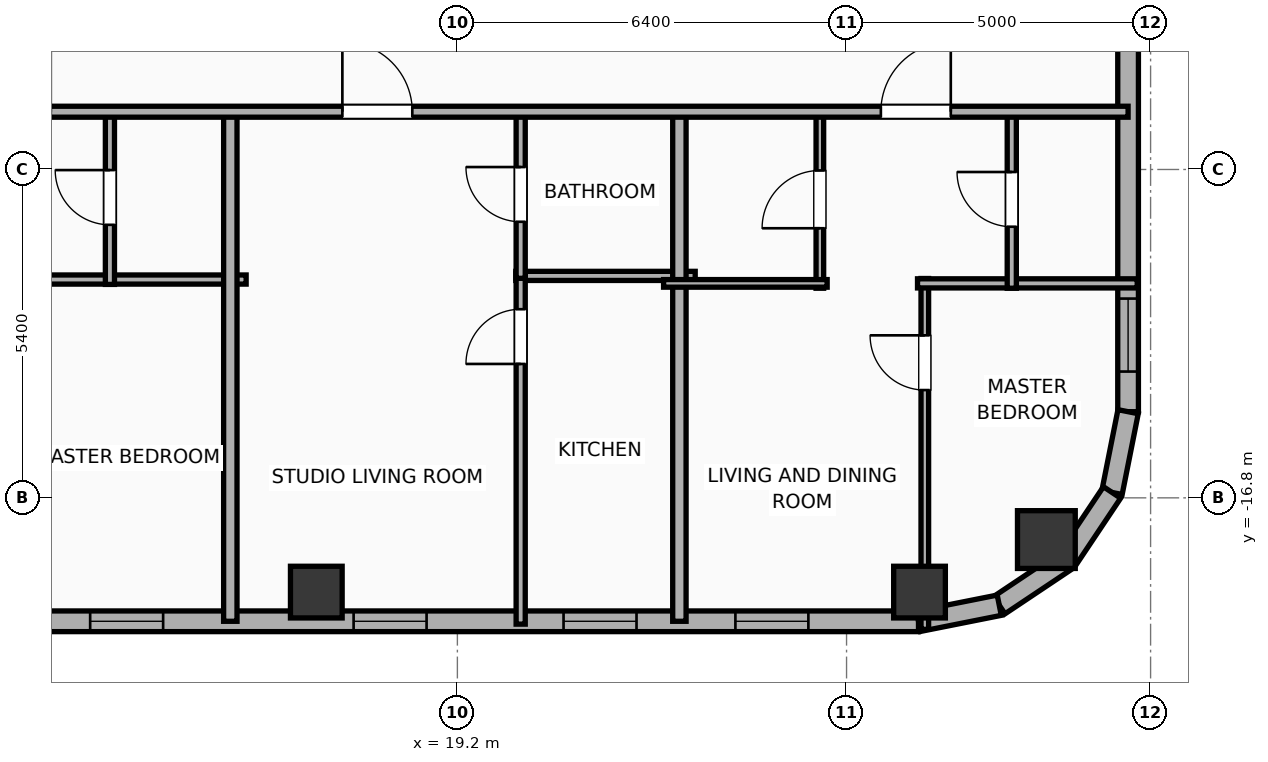
"""IFC4 building model, lengths in metres.
Left out: names, types, materials, properties, quantities, classifications, styles, units other than length and angle.
Written with IfcOpenShell. Run it as: python <this file> out.ifc"""

import sys

from ifc_helpers import new_model, si_unit, direction, frame, frame_2d, origin, origin_2d, place, context, subcontext, project, spatial, rectangle, hollow_rectangle, hollow_circle, extrude, element, fill, save


model = new_model("IFC4")
c1 = context("Model", 3, precision=1e-05, world=origin(), true_north=direction((0.0, 1.0)))
c2 = subcontext(c1, "Body", "Model", "MODEL_VIEW")
j1 = project(units=[si_unit("LENGTHUNIT", "METRE"), si_unit("PLANEANGLEUNIT", "RADIAN")], contexts=[c1])
p1 = place(None, origin())
s1 = spatial("IfcSite", under=j1, at=p1, CompositionType="ELEMENT")
p2 = place(p1, origin())
s2 = spatial("IfcBuilding", under=s1, at=p2, CompositionType="ELEMENT")
p3 = place(p2, frame((0.0, 0.0, 227.5)))
s3 = spatial("IfcBuildingStorey", under=s2, at=p3, CompositionType="ELEMENT", Elevation=227.5)
for number, where, z_axis, x_axis in (
    (1, (16.88, -18.35, 0.0), (0.0, 0.0, 1.0), (1.0, 0.0, 0.0)),
    (2, (26.8, -18.35, 0.0), (0.0, 0.0, 1.0), (1.0, 0.0, 0.0)),
):
    element("IfcColumn", number, at=place(p3, frame(where, z_axis=z_axis, x_axis=x_axis)), inside=s3, PredefinedType="COLUMN", context=c2, shape_type="SweptSolid", body=[
        extrude(hollow_rectangle(XDim=0.85, YDim=0.85, WallThickness=0.028, at=origin_2d()), origin(), (0.0, 0.0, 1.0), 3.9),
    ])
p4 = place(p3, frame((28.886, -17.486, 0.0), z_axis=(0.0, 0.0, 1.0), x_axis=(1.0, 0.0, 0.0)))
e3 = element("IfcColumn", 3, at=p4, inside=s3, PredefinedType="COLUMN", context=c2, shape_type="SweptSolid", body=[
    extrude(hollow_circle(Radius=0.475, WallThickness=0.032, at=origin_2d()), origin(), (0.0, 0.0, 1.0), 3.9),
])
p5 = place(p3, frame((26.783, -18.83, 0.0), z_axis=(0.0, 0.0, 1.0), x_axis=(-1.0, 0.0, 0.0)))
e4 = element("IfcWall", 4, at=p5, inside=s3, PredefinedType="ELEMENTEDWALL", context=c2, shape_type="SweptSolid", body=[
    extrude(rectangle(XDim=49.566, YDim=0.34, at=frame_2d((24.783, 0.0))), origin(), (0.0, 0.0, 1.0), 3.65),
])
p6 = place(p5, frame((23.583, 0.0, 0.75)))
e5 = element("IfcOpeningElement", 5, at=p6, cuts=e4, PredefinedType="OPENING", context=c2, shape_type="SweptSolid", body=[
    extrude(rectangle(XDim=2.4, YDim=2.1, at=frame_2d((1.2, 1.05))), frame((0.0, 0.18, 0.0), z_axis=(0.0, -1.0, 0.0), x_axis=(1.0, 0.0, 0.0)), (0.0, 0.0, 1.0), 0.36),
])
p7 = place(p5, frame((41.756, 0.0, 0.75)))
e6 = element("IfcOpeningElement", 6, at=p7, cuts=e4, PredefinedType="OPENING", context=c2, shape_type="SweptSolid", body=[
    extrude(rectangle(XDim=2.4, YDim=2.1, at=frame_2d((1.2, 1.05))), frame((0.0, 0.18, 0.0), z_axis=(0.0, -1.0, 0.0), x_axis=(1.0, 0.0, 0.0)), (0.0, 0.0, 1.0), 0.36),
])
p8 = place(p5, frame((47.222, 0.0, 0.75)))
e7 = element("IfcOpeningElement", 7, at=p8, cuts=e4, PredefinedType="OPENING", context=c2, shape_type="SweptSolid", body=[
    extrude(rectangle(XDim=1.2, YDim=2.05, at=frame_2d((0.6, 1.025))), frame((0.0, 0.18, 0.0), z_axis=(0.0, -1.0, 0.0), x_axis=(1.0, 0.0, 0.0)), (0.0, 0.0, 1.0), 0.36),
])
p9 = place(p5, frame((45.181, 0.0, 0.75)))
e8 = element("IfcOpeningElement", 8, at=p9, cuts=e4, PredefinedType="OPENING", context=c2, shape_type="SweptSolid", body=[
    extrude(rectangle(XDim=1.2, YDim=2.05, at=frame_2d((0.6, 1.025))), frame((0.0, 0.18, 0.0), z_axis=(0.0, -1.0, 0.0), x_axis=(1.0, 0.0, 0.0)), (0.0, 0.0, 1.0), 0.36),
])
p10 = place(p5, frame((37.289, 0.0, 0.75)))
e9 = element("IfcOpeningElement", 9, at=p10, cuts=e4, PredefinedType="OPENING", context=c2, shape_type="SweptSolid", body=[
    extrude(rectangle(XDim=1.2, YDim=2.05, at=frame_2d((0.6, 1.025))), frame((0.0, 0.18, 0.0), z_axis=(0.0, -1.0, 0.0), x_axis=(1.0, 0.0, 0.0)), (0.0, 0.0, 1.0), 0.36),
])
p11 = place(p5, frame((16.115, 0.0, 0.75)))
e10 = element("IfcOpeningElement", 10, at=p11, cuts=e4, PredefinedType="OPENING", context=c2, shape_type="SweptSolid", body=[
    extrude(rectangle(XDim=1.2, YDim=2.05, at=frame_2d((0.6, 1.025))), frame((0.0, 0.18, 0.0), z_axis=(0.0, -1.0, 0.0), x_axis=(1.0, 0.0, 0.0)), (0.0, 0.0, 1.0), 0.36),
])
p12 = place(p5, frame((12.422, 0.0, 0.75)))
e11 = element("IfcOpeningElement", 11, at=p12, cuts=e4, PredefinedType="OPENING", context=c2, shape_type="SweptSolid", body=[
    extrude(rectangle(XDim=1.2, YDim=2.05, at=frame_2d((0.6, 1.025))), frame((0.0, 0.18, 0.0), z_axis=(0.0, -1.0, 0.0), x_axis=(1.0, 0.0, 0.0)), (0.0, 0.0, 1.0), 0.36),
])
p13 = place(p5, frame((8.09, 0.0, 0.75)))
e12 = element("IfcOpeningElement", 12, at=p13, cuts=e4, PredefinedType="OPENING", context=c2, shape_type="SweptSolid", body=[
    extrude(rectangle(XDim=1.2, YDim=2.05, at=frame_2d((0.6, 1.025))), frame((0.0, 0.18, 0.0), z_axis=(0.0, -1.0, 0.0), x_axis=(1.0, 0.0, 0.0)), (0.0, 0.0, 1.0), 0.36),
])
p14 = place(p5, frame((4.637, 0.0, 0.75)))
e13 = element("IfcOpeningElement", 13, at=p14, cuts=e4, PredefinedType="OPENING", context=c2, shape_type="SweptSolid", body=[
    extrude(rectangle(XDim=1.2, YDim=2.05, at=frame_2d((0.6, 1.025))), frame((0.0, 0.18, 0.0), z_axis=(0.0, -1.0, 0.0), x_axis=(1.0, 0.0, 0.0)), (0.0, 0.0, 1.0), 0.36),
])
p15 = place(p5, frame((1.811, 0.0, 0.75)))
e14 = element("IfcOpeningElement", 14, at=p15, cuts=e4, PredefinedType="OPENING", context=c2, shape_type="SweptSolid", body=[
    extrude(rectangle(XDim=1.2, YDim=2.05, at=frame_2d((0.6, 1.025))), frame((0.0, 0.18, 0.0), z_axis=(0.0, -1.0, 0.0), x_axis=(1.0, 0.0, 0.0)), (0.0, 0.0, 1.0), 0.36),
])
p16 = place(p5, frame((32.253, 0.0, 0.75)))
e15 = element("IfcOpeningElement", 15, at=p16, cuts=e4, PredefinedType="OPENING", context=c2, shape_type="SweptSolid", body=[
    extrude(rectangle(XDim=1.2, YDim=2.05, at=frame_2d((0.6, 1.025))), frame((0.0, 0.18, 0.0), z_axis=(0.0, -1.0, 0.0), x_axis=(1.0, 0.0, 0.0)), (0.0, 0.0, 1.0), 0.36),
])
p17 = place(p5, frame((27.853, 0.0, 0.75)))
e16 = element("IfcOpeningElement", 16, at=p17, cuts=e4, PredefinedType="OPENING", context=c2, shape_type="SweptSolid", body=[
    extrude(rectangle(XDim=1.2, YDim=2.05, at=frame_2d((0.6, 1.025))), frame((0.0, 0.18, 0.0), z_axis=(0.0, -1.0, 0.0), x_axis=(1.0, 0.0, 0.0)), (0.0, 0.0, 1.0), 0.36),
])
p18 = place(p5, frame((20.473, 0.0, 0.75)))
e17 = element("IfcOpeningElement", 17, at=p18, cuts=e4, PredefinedType="OPENING", context=c2, shape_type="SweptSolid", body=[
    extrude(rectangle(XDim=1.2, YDim=2.05, at=frame_2d((0.6, 1.025))), frame((0.0, 0.18, 0.0), z_axis=(0.0, -1.0, 0.0), x_axis=(1.0, 0.0, 0.0)), (0.0, 0.0, 1.0), 0.36),
])
p19 = place(p3, frame((30.23, 16.583, 0.0), z_axis=(0.0, 0.0, 1.0), x_axis=(0.0, -1.0, 0.0)))
e18 = element("IfcWall", 18, at=p19, inside=s3, PredefinedType="ELEMENTEDWALL", context=c2, shape_type="SweptSolid", body=[
    extrude(rectangle(XDim=31.967, YDim=0.34, at=frame_2d((15.983, 0.0))), origin(), (0.0, 0.0, 1.0), 3.65),
])
p20 = place(p19, frame((30.106, 0.0, 0.75)))
e19 = element("IfcOpeningElement", 19, at=p20, cuts=e18, PredefinedType="OPENING", context=c2, shape_type="SweptSolid", body=[
    extrude(rectangle(XDim=1.2, YDim=2.05, at=frame_2d((0.6, 1.025))), frame((0.0, 0.18, 0.0), z_axis=(0.0, -1.0, 0.0), x_axis=(1.0, 0.0, 0.0)), (0.0, 0.0, 1.0), 0.36),
])
p21 = place(p19, frame((11.463, 0.0, 0.75)))
e20 = element("IfcOpeningElement", 20, at=p21, cuts=e18, PredefinedType="OPENING", context=c2, shape_type="SweptSolid", body=[
    extrude(rectangle(XDim=1.2, YDim=2.05, at=frame_2d((0.6, 1.025))), frame((0.0, 0.18, 0.0), z_axis=(0.0, -1.0, 0.0), x_axis=(1.0, 0.0, 0.0)), (0.0, 0.0, 1.0), 0.36),
])
p22 = place(p19, frame((20.363, 0.0, 0.75)))
e21 = element("IfcOpeningElement", 21, at=p22, cuts=e18, PredefinedType="OPENING", context=c2, shape_type="SweptSolid", body=[
    extrude(rectangle(XDim=1.2, YDim=2.05, at=frame_2d((0.6, 1.025))), frame((0.0, 0.18, 0.0), z_axis=(0.0, -1.0, 0.0), x_axis=(1.0, 0.0, 0.0)), (0.0, 0.0, 1.0), 0.36),
])
p23 = place(p3, frame((30.23, -15.383, 0.0), z_axis=(0.0, 0.0, 1.0), x_axis=(-0.195110379894, -0.98078129043, 0.0)))
e22 = element("IfcWall", 22, at=p23, inside=s3, PredefinedType="ELEMENTEDWALL", context=c2, shape_type="SweptSolid", body=[
    extrude(rectangle(XDim=1.354, YDim=0.34, at=frame_2d((0.677, 0.0))), origin(), (0.0, 0.0, 1.0), 3.65),
])
p24 = place(p3, frame((29.966, -16.711, 0.0), z_axis=(0.0, 0.0, 1.0), x_axis=(-0.555584683399, -0.831459956686, 0.0)))
e23 = element("IfcWall", 23, at=p24, inside=s3, PredefinedType="ELEMENTEDWALL", context=c2, shape_type="SweptSolid", body=[
    extrude(rectangle(XDim=1.337, YDim=0.34, at=frame_2d((0.668, 0.0))), origin(), (0.0, 0.0, 1.0), 3.65),
])
p25 = place(p3, frame((29.223, -17.823, 0.0), z_axis=(0.0, 0.0, 1.0), x_axis=(-0.831403586725, -0.555669034571, 0.0)))
e24 = element("IfcWall", 24, at=p25, inside=s3, PredefinedType="ELEMENTEDWALL", context=c2, shape_type="SweptSolid", body=[
    extrude(rectangle(XDim=1.337, YDim=0.34, at=frame_2d((0.668, 0.0))), origin(), (0.0, 0.0, 1.0), 3.65),
])
p26 = place(p3, frame((28.111, -18.566, 0.0), z_axis=(0.0, 0.0, 1.0), x_axis=(-0.980788153188, -0.195075878998, 0.0)))
e25 = element("IfcWall", 25, at=p26, inside=s3, PredefinedType="ELEMENTEDWALL", context=c2, shape_type="SweptSolid", body=[
    extrude(rectangle(XDim=1.354, YDim=0.34, at=frame_2d((0.677, 0.0))), origin(), (0.0, 0.0, 1.0), 3.65),
])
p27 = place(p3, frame((11.936, -13.21, 0.0), z_axis=(0.0, 0.0, 1.0), x_axis=(1.0, 0.0, 0.0)))
e26 = element("IfcWall", 26, at=p27, inside=s3, PredefinedType="PLUMBINGWALL", context=c2, shape_type="SweptSolid", body=[
    extrude(rectangle(XDim=3.79, YDim=0.15, at=frame_2d((1.895, 0.0))), origin(), (0.0, 0.0, 1.0), 3.65),
])
p28 = place(p3, frame((13.486, -13.29, 0.0), z_axis=(0.0, 0.0, 1.0), x_axis=(0.0, 1.0, 0.0)))
e27 = element("IfcWall", 27, at=p28, inside=s3, PredefinedType="PLUMBINGWALL", context=c2, shape_type="SweptSolid", body=[
    extrude(rectangle(XDim=2.86, YDim=0.15, at=frame_2d((1.43, 0.0))), origin(), (0.0, 0.0, 1.0), 3.65),
])
p29 = place(p28, frame((0.98, 0.0, 0.0)))
e28 = element("IfcOpeningElement", 28, at=p29, cuts=e27, PredefinedType="OPENING", context=c2, shape_type="SweptSolid", body=[
    extrude(rectangle(XDim=0.9, YDim=2.05, at=frame_2d((0.45, 1.025))), frame((0.0, 0.085, 0.0), z_axis=(0.0, -1.0, 0.0), x_axis=(1.0, 0.0, 0.0)), (0.0, 0.0, 1.0), 0.17),
])
p30 = place(p3, frame((15.466, -18.83, 0.0), z_axis=(0.0, 0.0, 1.0), x_axis=(0.0, 1.0, 0.0)))
e29 = element("IfcWall", 29, at=p30, inside=s3, PredefinedType="PARTITIONING", context=c2, shape_type="SweptSolid", body=[
    extrude(rectangle(XDim=8.46, YDim=0.22, at=frame_2d((4.23, 0.0))), origin(), (0.0, 0.0, 1.0), 3.65),
])
p31 = place(p3, frame((20.161, -13.15, 0.0), z_axis=(0.0, 0.0, 1.0), x_axis=(1.0, 0.0, 0.0)))
e30 = element("IfcWall", 30, at=p31, inside=s3, PredefinedType="PLUMBINGWALL", context=c2, shape_type="SweptSolid", body=[
    extrude(rectangle(XDim=2.95, YDim=0.15, at=frame_2d((1.475, 0.0))), origin(), (0.0, 0.0, 1.0), 3.65),
])
p32 = place(p3, frame((20.241, -18.877, 0.0), z_axis=(0.0, 0.0, 1.0), x_axis=(0.0, 1.0, 0.0)))
e31 = element("IfcWall", 31, at=p32, inside=s3, PredefinedType="PLUMBINGWALL", context=c2, shape_type="SweptSolid", body=[
    extrude(rectangle(XDim=5.767, YDim=0.15, at=frame_2d((2.883, 0.0))), origin(), (0.0, 0.0, 1.0), 3.65),
])
p33 = place(p32, frame((4.279, 0.0, 0.0)))
e32 = element("IfcOpeningElement", 32, at=p33, cuts=e31, PredefinedType="OPENING", context=c2, shape_type="SweptSolid", body=[
    extrude(rectangle(XDim=0.9, YDim=2.05, at=frame_2d((0.45, 1.025))), frame((0.0, 0.085, 0.0), z_axis=(0.0, -1.0, 0.0), x_axis=(1.0, 0.0, 0.0)), (0.0, 0.0, 1.0), 0.17),
])
p34 = place(p3, frame((20.241, -13.19, 0.0), z_axis=(0.0, 0.0, 1.0), x_axis=(0.0, 1.0, 0.0)))
e33 = element("IfcWall", 33, at=p34, inside=s3, PredefinedType="PLUMBINGWALL", context=c2, shape_type="SweptSolid", body=[
    extrude(rectangle(XDim=2.76, YDim=0.15, at=frame_2d((1.38, 0.0))), origin(), (0.0, 0.0, 1.0), 3.65),
])
p35 = place(p34, frame((0.93, 0.0, 0.0)))
e34 = element("IfcOpeningElement", 34, at=p35, cuts=e33, PredefinedType="OPENING", context=c2, shape_type="SweptSolid", body=[
    extrude(rectangle(XDim=0.9, YDim=2.05, at=frame_2d((0.45, 1.025))), frame((0.0, 0.085, 0.0), z_axis=(0.0, -1.0, 0.0), x_axis=(1.0, 0.0, 0.0)), (0.0, 0.0, 1.0), 0.17),
])
p36 = place(p3, frame((22.851, -18.83, 0.0), z_axis=(0.0, 0.0, 1.0), x_axis=(0.0, 1.0, 0.0)))
e35 = element("IfcWall", 35, at=p36, inside=s3, PredefinedType="PARTITIONING", context=c2, shape_type="SweptSolid", body=[
    extrude(rectangle(XDim=8.46, YDim=0.22, at=frame_2d((4.23, 0.0))), origin(), (0.0, 0.0, 1.0), 3.65),
])
p37 = place(p3, frame((26.887, -18.962, 0.0), z_axis=(0.0, 0.0, 1.0), x_axis=(0.0, 1.0, 0.0)))
e36 = element("IfcWall", 36, at=p37, inside=s3, PredefinedType="PARTITIONING", context=c2, shape_type="SweptSolid", body=[
    extrude(rectangle(XDim=5.769, YDim=0.125, at=frame_2d((2.885, 0.0))), origin(), (0.0, 0.0, 1.0), 3.65),
])
p38 = place(p37, frame((3.935, 0.0, 0.0)))
e37 = element("IfcOpeningElement", 37, at=p38, cuts=e36, PredefinedType="OPENING", context=c2, shape_type="SweptSolid", body=[
    extrude(rectangle(XDim=0.9, YDim=2.05, at=frame_2d((0.45, 1.025))), frame((0.0, 0.073, 0.0), z_axis=(0.0, -1.0, 0.0), x_axis=(1.0, 0.0, 0.0)), (0.0, 0.0, 1.0), 0.145),
])
p39 = place(p3, frame((26.767, -13.273, 0.0), z_axis=(0.0, 0.0, 1.0), x_axis=(1.0, 0.0, 0.0)))
e38 = element("IfcWall", 38, at=p39, inside=s3, PredefinedType="PLUMBINGWALL", context=c2, shape_type="SweptSolid", body=[
    extrude(rectangle(XDim=3.613, YDim=0.15, at=frame_2d((1.806, 0.0))), origin(), (0.0, 0.0, 1.0), 3.65),
])
p40 = place(p3, frame((25.161, -13.353, 0.0), z_axis=(0.0, 0.0, 1.0), x_axis=(0.0, 1.0, 0.0)))
e39 = element("IfcWall", 39, at=p40, inside=s3, PredefinedType="PARTITIONING", context=c2, shape_type="SweptSolid", body=[
    extrude(rectangle(XDim=2.923, YDim=0.125, at=frame_2d((1.461, 0.0))), origin(), (0.0, 0.0, 1.0), 3.65),
])
p41 = place(p40, frame((0.987, 0.0, 0.0)))
e40 = element("IfcOpeningElement", 40, at=p41, cuts=e39, PredefinedType="OPENING", context=c2, shape_type="SweptSolid", body=[
    extrude(rectangle(XDim=0.95, YDim=2.05, at=frame_2d((0.475, 1.025))), frame((0.0, 0.073, 0.0), z_axis=(0.0, -1.0, 0.0), x_axis=(1.0, 0.0, 0.0)), (0.0, 0.0, 1.0), 0.145),
])
p42 = place(p3, frame((22.591, -13.273, 0.0), z_axis=(0.0, 0.0, 1.0), x_axis=(1.0, 0.0, 0.0)))
e41 = element("IfcWall", 41, at=p42, inside=s3, PredefinedType="PARTITIONING", context=c2, shape_type="SweptSolid", body=[
    extrude(rectangle(XDim=2.69, YDim=0.125, at=frame_2d((1.345, 0.0))), origin(), (0.0, 0.0, 1.0), 3.65),
])
p43 = place(p3, frame((28.317, -13.353, 0.0), z_axis=(0.0, 0.0, 1.0), x_axis=(0.0, 1.0, 0.0)))
e42 = element("IfcWall", 42, at=p43, inside=s3, PredefinedType="PLUMBINGWALL", context=c2, shape_type="SweptSolid", body=[
    extrude(rectangle(XDim=2.923, YDim=0.15, at=frame_2d((1.461, 0.0))), origin(), (0.0, 0.0, 1.0), 3.65),
])
p44 = place(p43, frame((1.011, 0.0, 0.0)))
e43 = element("IfcOpeningElement", 43, at=p44, cuts=e42, PredefinedType="OPENING", context=c2, shape_type="SweptSolid", body=[
    extrude(rectangle(XDim=0.9, YDim=2.05, at=frame_2d((0.45, 1.025))), frame((0.0, 0.085, 0.0), z_axis=(0.0, -1.0, 0.0), x_axis=(1.0, 0.0, 0.0)), (0.0, 0.0, 1.0), 0.17),
])
p45 = place(p3, frame((8.08, -10.45, 0.0), z_axis=(0.0, 0.0, 1.0), x_axis=(1.0, 0.0, 0.0)))
e44 = element("IfcWall", 44, at=p45, inside=s3, PredefinedType="PARTITIONING", context=c2, shape_type="SweptSolid", body=[
    extrude(rectangle(XDim=22.15, YDim=0.18, at=frame_2d((11.075, 0.0))), origin(), (0.0, 0.0, 1.0), 3.65),
])
p46 = place(p45, frame((3.283, 0.0, 0.0)))
e45 = element("IfcOpeningElement", 45, at=p46, cuts=e44, PredefinedType="OPENING", context=c2, shape_type="SweptSolid", body=[
    extrude(rectangle(XDim=1.15, YDim=2.05, at=frame_2d((0.575, 1.025))), frame((0.0, 0.1, 0.0), z_axis=(0.0, -1.0, 0.0), x_axis=(1.0, 0.0, 0.0)), (0.0, 0.0, 1.0), 0.2),
])
p47 = place(p45, frame((9.229, 0.0, 0.0)))
e46 = element("IfcOpeningElement", 46, at=p47, cuts=e44, PredefinedType="OPENING", context=c2, shape_type="SweptSolid", body=[
    extrude(rectangle(XDim=1.15, YDim=2.05, at=frame_2d((0.575, 1.025))), frame((0.0, 0.1, 0.0), z_axis=(0.0, -1.0, 0.0), x_axis=(1.0, 0.0, 0.0)), (0.0, 0.0, 1.0), 0.2),
])
p48 = place(p45, frame((18.084, 0.0, 0.0)))
e47 = element("IfcOpeningElement", 47, at=p48, cuts=e44, PredefinedType="OPENING", context=c2, shape_type="SweptSolid", body=[
    extrude(rectangle(XDim=1.15, YDim=2.05, at=frame_2d((0.575, 1.025))), frame((0.0, 0.1, 0.0), z_axis=(0.0, -1.0, 0.0), x_axis=(1.0, 0.0, 0.0)), (0.0, 0.0, 1.0), 0.2),
])
p49 = place(p12, origin())
e48 = element("IfcWindow", 48, at=p49, inside=s3, PartitioningType="SINGLE_PANEL", PredefinedType="WINDOW", context=c2, shape_type="SweptSolid", body=[
    extrude(rectangle(XDim=1.2, YDim=2.05, at=frame_2d((0.6, 1.025))), frame((0.0, 0.03, 0.0), z_axis=(0.0, -1.0, 0.0), x_axis=(1.0, 0.0, 0.0)), (0.0, 0.0, 1.0), 0.06),
])
fill(e11, e48)
p50 = place(p13, origin())
e49 = element("IfcWindow", 49, at=p50, inside=s3, PartitioningType="SINGLE_PANEL", PredefinedType="WINDOW", context=c2, shape_type="SweptSolid", body=[
    extrude(rectangle(XDim=1.2, YDim=2.05, at=frame_2d((0.6, 1.025))), frame((0.0, 0.03, 0.0), z_axis=(0.0, -1.0, 0.0), x_axis=(1.0, 0.0, 0.0)), (0.0, 0.0, 1.0), 0.06),
])
fill(e12, e49)
p51 = place(p14, origin())
e50 = element("IfcWindow", 50, at=p51, inside=s3, PartitioningType="SINGLE_PANEL", PredefinedType="WINDOW", context=c2, shape_type="SweptSolid", body=[
    extrude(rectangle(XDim=1.2, YDim=2.05, at=frame_2d((0.6, 1.025))), frame((0.0, 0.03, 0.0), z_axis=(0.0, -1.0, 0.0), x_axis=(1.0, 0.0, 0.0)), (0.0, 0.0, 1.0), 0.06),
])
fill(e13, e50)
p52 = place(p15, origin())
e51 = element("IfcWindow", 51, at=p52, inside=s3, PartitioningType="SINGLE_PANEL", PredefinedType="WINDOW", context=c2, shape_type="SweptSolid", body=[
    extrude(rectangle(XDim=1.2, YDim=2.05, at=frame_2d((0.6, 1.025))), frame((0.0, 0.03, 0.0), z_axis=(0.0, -1.0, 0.0), x_axis=(1.0, 0.0, 0.0)), (0.0, 0.0, 1.0), 0.06),
])
fill(e14, e51)
p53 = place(p20, origin())
e52 = element("IfcWindow", 52, at=p53, inside=s3, PartitioningType="SINGLE_PANEL", PredefinedType="WINDOW", context=c2, shape_type="SweptSolid", body=[
    extrude(rectangle(XDim=1.2, YDim=2.05, at=frame_2d((0.6, 1.025))), frame((0.0, 0.03, 0.0), z_axis=(0.0, -1.0, 0.0), x_axis=(1.0, 0.0, 0.0)), (0.0, 0.0, 1.0), 0.06),
])
fill(e19, e52)
p54 = place(p29, origin())
e53 = element("IfcDoor", 53, at=p54, inside=s3, OperationType="SINGLE_SWING_RIGHT", PredefinedType="DOOR", context=c2, shape_type="SweptSolid", body=[
    extrude(rectangle(XDim=0.9, YDim=2.05, at=frame_2d((0.45, 1.025))), frame((0.0, 0.025, 0.0), z_axis=(0.0, -1.0, 0.0), x_axis=(1.0, 0.0, 0.0)), (0.0, 0.0, 1.0), 0.05),
])
fill(e28, e53)
p55 = place(p33, origin())
e54 = element("IfcDoor", 54, at=p55, inside=s3, OperationType="SINGLE_SWING_LEFT", PredefinedType="DOOR", context=c2, shape_type="SweptSolid", body=[
    extrude(rectangle(XDim=0.9, YDim=2.05, at=frame_2d((0.45, 1.025))), frame((0.0, 0.025, 0.0), z_axis=(0.0, -1.0, 0.0), x_axis=(1.0, 0.0, 0.0)), (0.0, 0.0, 1.0), 0.05),
])
fill(e32, e54)
p56 = place(p35, origin())
e55 = element("IfcDoor", 55, at=p56, inside=s3, OperationType="SINGLE_SWING_RIGHT", PredefinedType="DOOR", context=c2, shape_type="SweptSolid", body=[
    extrude(rectangle(XDim=0.9, YDim=2.05, at=frame_2d((0.45, 1.025))), frame((0.0, 0.025, 0.0), z_axis=(0.0, -1.0, 0.0), x_axis=(1.0, 0.0, 0.0)), (0.0, 0.0, 1.0), 0.05),
])
fill(e34, e55)
p57 = place(p38, origin())
e56 = element("IfcDoor", 56, at=p57, inside=s3, OperationType="SINGLE_SWING_RIGHT", PredefinedType="DOOR", context=c2, shape_type="SweptSolid", body=[
    extrude(rectangle(XDim=0.9, YDim=2.05, at=frame_2d((0.45, 1.025))), frame((0.0, 0.025, 0.0), z_axis=(0.0, -1.0, 0.0), x_axis=(1.0, 0.0, 0.0)), (0.0, 0.0, 1.0), 0.05),
])
fill(e37, e56)
p58 = place(p41, origin())
e57 = element("IfcDoor", 57, at=p58, inside=s3, OperationType="SINGLE_SWING_LEFT", PredefinedType="DOOR", context=c2, shape_type="SweptSolid", body=[
    extrude(rectangle(XDim=0.95, YDim=2.05, at=frame_2d((0.475, 1.025))), frame((0.0, 0.025, 0.0), z_axis=(0.0, -1.0, 0.0), x_axis=(1.0, 0.0, 0.0)), (0.0, 0.0, 1.0), 0.05),
])
fill(e40, e57)
p59 = place(p44, origin())
e58 = element("IfcDoor", 58, at=p59, inside=s3, OperationType="SINGLE_SWING_RIGHT", PredefinedType="DOOR", context=c2, shape_type="SweptSolid", body=[
    extrude(rectangle(XDim=0.9, YDim=2.05, at=frame_2d((0.45, 1.025))), frame((0.0, 0.025, 0.0), z_axis=(0.0, -1.0, 0.0), x_axis=(1.0, 0.0, 0.0)), (0.0, 0.0, 1.0), 0.05),
])
fill(e43, e58)
p60 = place(p47, origin())
e59 = element("IfcDoor", 59, at=p60, inside=s3, OperationType="SINGLE_SWING_LEFT", PredefinedType="DOOR", context=c2, shape_type="SweptSolid", body=[
    extrude(rectangle(XDim=1.15, YDim=2.05, at=frame_2d((0.575, 1.025))), frame((0.0, 0.025, 0.0), z_axis=(0.0, -1.0, 0.0), x_axis=(1.0, 0.0, 0.0)), (0.0, 0.0, 1.0), 0.05),
])
fill(e46, e59)
p61 = place(p48, origin())
e60 = element("IfcDoor", 60, at=p61, inside=s3, OperationType="SINGLE_SWING_RIGHT", PredefinedType="DOOR", context=c2, shape_type="SweptSolid", body=[
    extrude(rectangle(XDim=1.15, YDim=2.05, at=frame_2d((0.575, 1.025))), frame((0.0, 0.025, 0.0), z_axis=(0.0, -1.0, 0.0), x_axis=(1.0, 0.0, 0.0)), (0.0, 0.0, 1.0), 0.05),
])
fill(e47, e60)
save(model, sys.argv[1])
